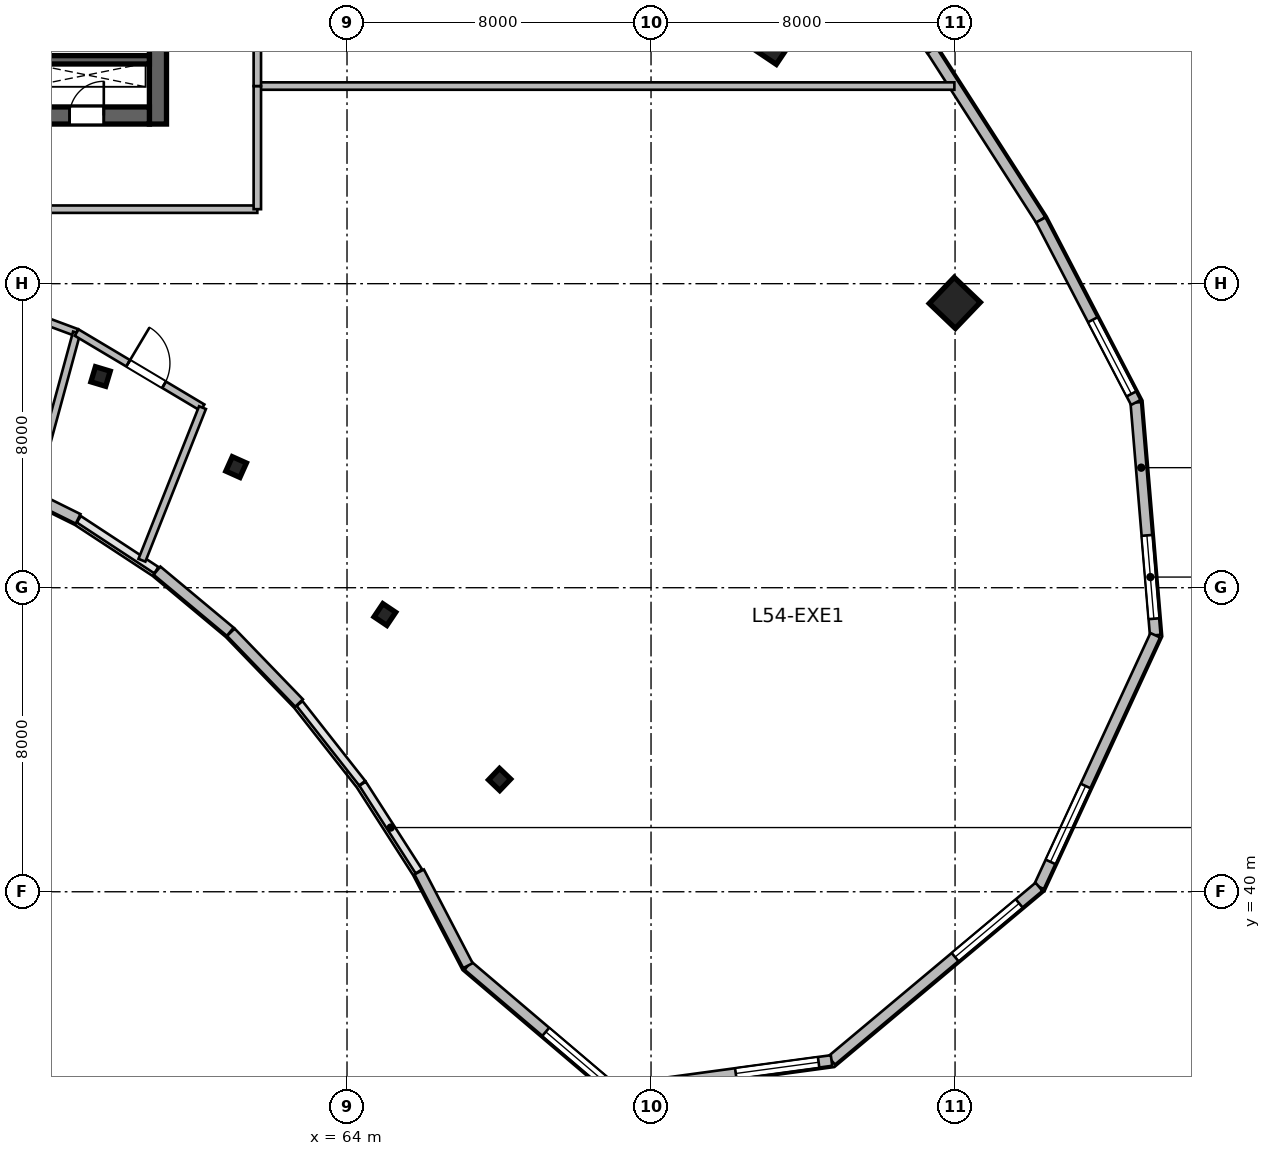
"""IFC4 building model, lengths in metres.
Left out: names, types, materials, properties, quantities, classifications, styles, units other than length and angle.
Written with IfcOpenShell. Run it as: python <this file> out.ifc"""

import sys

from ifc_helpers import new_model, si_unit, direction, frame, frame_2d, origin, origin_2d, place, context, subcontext, project, spatial, rectangle, i_section, extrude, source, transform, mapped, element, fill, save


model = new_model("IFC4")
c1 = context("Model", 3, precision=1e-05, world=origin(), true_north=direction((0.0, 1.0)))
c2 = subcontext(c1, "Body", "Model", "MODEL_VIEW")
j1 = project(units=[si_unit("LENGTHUNIT", "METRE"), si_unit("PLANEANGLEUNIT", "RADIAN")], contexts=[c1])
p1 = place(None, origin())
s1 = spatial("IfcSite", under=j1, at=p1, CompositionType="ELEMENT")
p2 = place(p1, origin())
s2 = spatial("IfcBuilding", under=s1, at=p2, CompositionType="ELEMENT")
p3 = place(p2, frame((0.0, 0.0, 223.5)))
s3 = spatial("IfcBuildingStorey", under=s2, at=p3, CompositionType="ELEMENT", Elevation=223.5)
m1 = source(origin(), c2, "Body", "SweptSolid", [
    extrude(rectangle(XDim=12.0, YDim=0.45, at=frame_2d((6.0, 0.0))), origin(), (0.0, 0.0, 1.0), 3.9),
])
p4 = place(p3, frame((59.025, 60.2, 0.0), z_axis=(0.0, 0.0, 1.0), x_axis=(0.0, 1.0, 0.0)))
e1 = element("IfcWall", 1, at=p4, inside=s3, PredefinedType="SHEAR", context=c2, shape_type="MappedRepresentation", body=[
    mapped(m1, transform((0.0, 0.0, 0.0), scale=1.0)),
])
m2 = source(origin(), c2, "Body", "SweptSolid", [
    extrude(rectangle(XDim=21.6, YDim=0.45, at=frame_2d((10.8, 0.0))), origin(), (0.0, 0.0, 1.0), 3.9),
])
p5 = place(p3, frame((37.2, 60.425, 0.0), z_axis=(0.0, 0.0, 1.0), x_axis=(1.0, 0.0, 0.0)))
e2 = element("IfcWall", 2, at=p5, inside=s3, PredefinedType="SHEAR", context=c2, shape_type="MappedRepresentation", body=[
    mapped(m2, transform((0.0, 0.0, 0.0), scale=1.0)),
])
p6 = place(p5, frame((1.1, 0.0, 0.0)))
e3 = element("IfcOpeningElement", 3, at=p6, cuts=e2, PredefinedType="OPENING", context=c2, shape_type="SweptSolid", body=[
    extrude(rectangle(XDim=1.15, YDim=2.15, at=frame_2d((0.575, 1.075))), frame((0.0, 0.235, 0.0), z_axis=(0.0, -1.0, 0.0), x_axis=(1.0, 0.0, 0.0)), (0.0, 0.0, 1.0), 0.47),
])
p7 = place(p5, frame((19.5, 0.0, 0.0)))
e4 = element("IfcOpeningElement", 4, at=p7, cuts=e2, PredefinedType="OPENING", context=c2, shape_type="SweptSolid", body=[
    extrude(rectangle(XDim=0.9, YDim=2.1, at=frame_2d((0.45, 1.05))), frame((0.0, 0.235, 0.0), z_axis=(0.0, -1.0, 0.0), x_axis=(1.0, 0.0, 0.0)), (0.0, 0.0, 1.0), 0.47),
])
p8 = place(p5, frame((12.02, 0.0, 0.0)))
e5 = element("IfcOpeningElement", 5, at=p8, cuts=e2, PredefinedType="OPENING", context=c2, shape_type="SweptSolid", body=[
    extrude(rectangle(XDim=1.6, YDim=2.15, at=frame_2d((0.8, 1.075))), frame((0.0, 0.235, 0.0), z_axis=(0.0, -1.0, 0.0), x_axis=(1.0, 0.0, 0.0)), (0.0, 0.0, 1.0), 0.47),
])
m3 = source(origin(), c2, "Body", "SweptSolid", [
    extrude(rectangle(XDim=3.27, YDim=0.22, at=frame_2d((1.635, 0.0))), origin(), (0.0, 0.0, 1.0), 3.9),
])
p9 = place(p3, frame((55.53, 61.89, 0.0), z_axis=(0.0, 0.0, 1.0), x_axis=(1.0, 0.0, 0.0)))
e6 = element("IfcWall", 6, at=p9, inside=s3, PredefinedType="SHEAR", context=c2, shape_type="MappedRepresentation", body=[
    mapped(m3, transform((0.0, 0.0, 0.0), scale=1.0)),
])
m4 = source(origin(), c2, "Body", "SweptSolid", [
    extrude(i_section(OverallWidth=0.406, OverallDepth=0.416, WebThickness=0.03, FlangeThickness=0.048, at=origin_2d()), origin(), (0.0, 0.0, 1.0), 3.9),
])
for number, where, z_axis, x_axis in (
    (7, (57.515, 53.558, 0.0), (0.0, 0.0, 1.0), (0.289, 0.957, 0.0)),
    (8, (61.082, 51.175, 0.0), (0.0, 0.0, 1.0), (0.409, 0.912, 0.0)),
    (9, (64.996, 47.294, 0.0), (0.0, 0.0, 1.0), (0.558, 0.83, 0.0)),
):
    element("IfcColumn", number, at=place(p3, frame(where, z_axis=z_axis, x_axis=x_axis)), inside=s3, PredefinedType="COLUMN", context=c2, shape_type="MappedRepresentation", body=[
        mapped(m4, transform((0.0, 0.0, 0.0), scale=1.0)),
    ])
m5 = source(origin(), c2, "Body", "SweptSolid", [
    extrude(rectangle(XDim=0.95, YDim=0.95, at=origin_2d()), origin(), (0.0, 0.0, 1.0), 3.9),
])
p10 = place(p3, frame((75.167, 62.43, 0.0), z_axis=(0.0, 0.0, 1.0), x_axis=(0.55774510898, 0.830012285095, 0.0)))
e10 = element("IfcColumn", 10, at=p10, inside=s3, PredefinedType="COLUMN", context=c2, shape_type="MappedRepresentation", body=[
    mapped(m5, transform((0.0, 0.0, 0.0), scale=1.0)),
])
p11 = place(p3, frame((68.015, 42.955, 0.0), z_axis=(0.0, 0.0, 1.0), x_axis=(0.690756218984, 0.723087716626, 0.0)))
e11 = element("IfcColumn", 11, at=p11, inside=s3, PredefinedType="COLUMN", context=c2, shape_type="MappedRepresentation", body=[
    mapped(m4, transform((0.0, 0.0, 0.0), scale=1.0)),
])
p12 = place(p3, frame((79.993, 55.494, 0.0), z_axis=(0.0, 0.0, 1.0), x_axis=(0.690756218984, 0.723087716626, 0.0)))
e12 = element("IfcColumn", 12, at=p12, inside=s3, PredefinedType="COLUMN", context=c2, shape_type="MappedRepresentation", body=[
    mapped(m5, transform((0.0, 0.0, 0.0), scale=1.0)),
])
m6 = source(origin(), c2, "Body", "SweptSolid", [
    extrude(rectangle(XDim=6.146, YDim=0.28, at=frame_2d((3.073, 0.0))), origin(), (0.0, 0.0, 1.0), 3.64),
])
p13 = place(p3, frame((84.756, 52.874, 0.0), z_axis=(0.0, 0.0, 1.0), x_axis=(0.083301904456, -0.996524356307, 0.0)))
e13 = element("IfcWall", 13, at=p13, inside=s3, PredefinedType="SOLIDWALL", context=c2, shape_type="MappedRepresentation", body=[
    mapped(m6, transform((0.0, 0.0, 0.0), scale=1.0)),
])
p14 = place(p13, frame((3.509, 0.0, 0.95)))
e14 = element("IfcOpeningElement", 14, at=p14, cuts=e13, PredefinedType="OPENING", context=c2, shape_type="SweptSolid", body=[
    extrude(rectangle(XDim=2.2, YDim=2.1, at=frame_2d((1.1, 1.05))), frame((0.0, 0.15, 0.0), z_axis=(0.0, -1.0, 0.0), x_axis=(1.0, 0.0, 0.0)), (0.0, 0.0, 1.0), 0.3),
])
m7 = source(origin(), c2, "Body", "SweptSolid", [
    extrude(rectangle(XDim=7.292, YDim=0.28, at=frame_2d((3.646, 0.0))), origin(), (0.0, 0.0, 1.0), 3.64),
])
p15 = place(p3, frame((85.268, 46.749, 0.0), z_axis=(0.0, 0.0, 1.0), x_axis=(-0.419642001049, -0.907689699708, 0.0)))
e15 = element("IfcWall", 15, at=p15, inside=s3, PredefinedType="SOLIDWALL", context=c2, shape_type="MappedRepresentation", body=[
    mapped(m7, transform((0.0, 0.0, 0.0), scale=1.0)),
])
p16 = place(p15, frame((4.369, 0.0, 0.95)))
e16 = element("IfcOpeningElement", 16, at=p16, cuts=e15, PredefinedType="OPENING", context=c2, shape_type="SweptSolid", body=[
    extrude(rectangle(XDim=2.2, YDim=2.1, at=frame_2d((1.1, 1.05))), frame((0.0, 0.15, 0.0), z_axis=(0.0, -1.0, 0.0), x_axis=(1.0, 0.0, 0.0)), (0.0, 0.0, 1.0), 0.3),
])
m8 = source(origin(), c2, "Body", "SweptSolid", [
    extrude(rectangle(XDim=7.12, YDim=0.28, at=frame_2d((3.56, 0.0))), origin(), (0.0, 0.0, 1.0), 3.64),
])
p17 = place(p3, frame((82.208, 40.131, 0.0), z_axis=(0.0, 0.0, 1.0), x_axis=(-0.766709783564, -0.641993853387, 0.0)))
e17 = element("IfcWall", 17, at=p17, inside=s3, PredefinedType="SOLIDWALL", context=c2, shape_type="MappedRepresentation", body=[
    mapped(m8, transform((0.0, 0.0, 0.0), scale=1.0)),
])
p18 = place(p17, frame((0.68, 0.0, 0.95)))
e18 = element("IfcOpeningElement", 18, at=p18, cuts=e17, PredefinedType="OPENING", context=c2, shape_type="SweptSolid", body=[
    extrude(rectangle(XDim=2.2, YDim=2.1, at=frame_2d((1.1, 1.05))), frame((0.0, 0.15, 0.0), z_axis=(0.0, -1.0, 0.0), x_axis=(1.0, 0.0, 0.0)), (0.0, 0.0, 1.0), 0.3),
])
m9 = source(origin(), c2, "Body", "SweptSolid", [
    extrude(rectangle(XDim=5.771, YDim=0.28, at=frame_2d((2.886, 0.0))), origin(), (0.0, 0.0, 1.0), 3.64),
])
p19 = place(p3, frame((76.75, 35.56, 0.0), z_axis=(0.0, 0.0, 1.0), x_axis=(-0.990933615537, -0.134352408237, 0.0)))
e19 = element("IfcWall", 19, at=p19, inside=s3, PredefinedType="SOLIDWALL", context=c2, shape_type="MappedRepresentation", body=[
    mapped(m9, transform((0.0, 0.0, 0.0), scale=1.0)),
])
p20 = place(p19, frame((0.343, 0.0, 0.95)))
e20 = element("IfcOpeningElement", 20, at=p20, cuts=e19, PredefinedType="OPENING", context=c2, shape_type="SweptSolid", body=[
    extrude(rectangle(XDim=2.2, YDim=2.1, at=frame_2d((1.1, 1.05))), frame((0.0, 0.15, 0.0), z_axis=(0.0, -1.0, 0.0), x_axis=(1.0, 0.0, 0.0)), (0.0, 0.0, 1.0), 0.3),
])
m10 = source(origin(), c2, "Body", "SweptSolid", [
    extrude(rectangle(XDim=5.051, YDim=0.28, at=frame_2d((2.525, 0.0))), origin(), (0.0, 0.0, 1.0), 3.64),
])
p21 = place(p3, frame((71.031, 34.784, 0.0), z_axis=(0.0, 0.0, 1.0), x_axis=(-0.761904731537, 0.647689107568, 0.0)))
e21 = element("IfcWall", 21, at=p21, inside=s3, PredefinedType="SOLIDWALL", context=c2, shape_type="MappedRepresentation", body=[
    mapped(m10, transform((0.0, 0.0, 0.0), scale=1.0)),
])
p22 = place(p21, frame((0.163, 0.0, 0.95)))
e22 = element("IfcOpeningElement", 22, at=p22, cuts=e21, PredefinedType="OPENING", context=c2, shape_type="SweptSolid", body=[
    extrude(rectangle(XDim=2.2, YDim=2.1, at=frame_2d((1.1, 1.05))), frame((0.0, 0.15, 0.0), z_axis=(0.0, -1.0, 0.0), x_axis=(1.0, 0.0, 0.0)), (0.0, 0.0, 1.0), 0.3),
])
m11 = source(origin(), c2, "Body", "SweptSolid", [
    extrude(rectangle(XDim=2.779, YDim=0.28, at=frame_2d((1.39, 0.0))), origin(), (0.0, 0.0, 1.0), 3.64),
])
p23 = place(p3, frame((67.182, 38.056, 0.0), z_axis=(0.0, 0.0, 1.0), x_axis=(-0.461770308601, 0.886999538948, 0.0)))
e23 = element("IfcWall", 23, at=p23, inside=s3, PredefinedType="SOLIDWALL", context=c2, shape_type="MappedRepresentation", body=[
    mapped(m11, transform((0.0, 0.0, 0.0), scale=1.0)),
])
m12 = source(origin(), c2, "Body", "SweptSolid", [
    extrude(rectangle(XDim=2.588, YDim=0.28, at=frame_2d((1.294, 0.0))), origin(), (0.0, 0.0, 1.0), 3.64),
])
p24 = place(p3, frame((62.74, 44.966, 0.0), z_axis=(0.0, 0.0, 1.0), x_axis=(-0.694687114507, 0.719312041424, 0.0)))
e24 = element("IfcWall", 24, at=p24, inside=s3, PredefinedType="SOLIDWALL", context=c2, shape_type="MappedRepresentation", body=[
    mapped(m12, transform((0.0, 0.0, 0.0), scale=1.0)),
])
m13 = source(origin(), c2, "Body", "SweptSolid", [
    extrude(rectangle(XDim=2.511, YDim=0.28, at=frame_2d((1.256, 0.0))), origin(), (0.0, 0.0, 1.0), 3.64),
])
p25 = place(p3, frame((60.928, 46.841, 0.0), z_axis=(0.0, 0.0, 1.0), x_axis=(-0.767910416122, 0.640557251782, 0.0)))
e25 = element("IfcWall", 25, at=p25, inside=s3, PredefinedType="SOLIDWALL", context=c2, shape_type="MappedRepresentation", body=[
    mapped(m13, transform((0.0, 0.0, 0.0), scale=1.0)),
])
m14 = source(origin(), c2, "Body", "SweptSolid", [
    extrude(rectangle(XDim=2.378, YDim=0.28, at=frame_2d((1.189, 0.0))), origin(), (0.0, 0.0, 1.0), 3.64),
])
p26 = place(p3, frame((56.924, 49.812, 0.0), z_axis=(0.0, 0.0, 1.0), x_axis=(-0.895941616831, 0.444171835252, 0.0)))
e26 = element("IfcWall", 26, at=p26, inside=s3, PredefinedType="SOLIDWALL", context=c2, shape_type="MappedRepresentation", body=[
    mapped(m14, transform((0.0, 0.0, 0.0), scale=1.0)),
])
m15 = source(origin(), c2, "Body", "SweptSolid", [
    extrude(rectangle(XDim=5.153, YDim=0.28, at=frame_2d((2.577, 0.0))), origin(), (0.0, 0.0, 1.0), 3.64),
])
p27 = place(p3, frame((76.205, 66.19, 0.0), z_axis=(0.0, 0.0, 1.0), x_axis=(0.618179283891, -0.786037132054, 0.0)))
e27 = element("IfcWall", 27, at=p27, inside=s3, PredefinedType="SOLIDWALL", context=c2, shape_type="MappedRepresentation", body=[
    mapped(m15, transform((0.0, 0.0, 0.0), scale=1.0)),
])
m16 = source(origin(), c2, "Body", "SweptSolid", [
    extrude(rectangle(XDim=5.303, YDim=0.28, at=frame_2d((2.651, 0.0))), origin(), (0.0, 0.0, 1.0), 3.64),
])
p28 = place(p3, frame((79.391, 62.14, 0.0), z_axis=(0.0, 0.0, 1.0), x_axis=(0.540178067041, -0.84155074469, 0.0)))
e28 = element("IfcWall", 28, at=p28, inside=s3, PredefinedType="SOLIDWALL", context=c2, shape_type="MappedRepresentation", body=[
    mapped(m16, transform((0.0, 0.0, 0.0), scale=1.0)),
])
m17 = source(origin(), c2, "Body", "SweptSolid", [
    extrude(rectangle(XDim=5.416, YDim=0.28, at=frame_2d((2.708, 0.0))), origin(), (0.0, 0.0, 1.0), 3.64),
])
p29 = place(p3, frame((82.255, 57.677, 0.0), z_axis=(0.0, 0.0, 1.0), x_axis=(0.46177852435, -0.886995261796, 0.0)))
e29 = element("IfcWall", 29, at=p29, inside=s3, PredefinedType="SOLIDWALL", context=c2, shape_type="MappedRepresentation", body=[
    mapped(m17, transform((0.0, 0.0, 0.0), scale=1.0)),
])
p30 = place(p29, frame((2.962, 0.0, 0.95)))
e30 = element("IfcOpeningElement", 30, at=p30, cuts=e29, PredefinedType="OPENING", context=c2, shape_type="SweptSolid", body=[
    extrude(rectangle(XDim=2.2, YDim=2.1, at=frame_2d((1.1, 1.05))), frame((0.0, 0.15, 0.0), z_axis=(0.0, -1.0, 0.0), x_axis=(1.0, 0.0, 0.0)), (0.0, 0.0, 1.0), 0.3),
])
m18 = source(origin(), c2, "Body", "SweptSolid", [
    extrude(rectangle(XDim=4.191, YDim=0.195, at=frame_2d((2.095, 0.0))), origin(), (0.0, 0.0, 1.0), 3.64),
])
p31 = place(p3, frame((52.957, 56.174, 0.0), z_axis=(0.0, 0.0, 1.0), x_axis=(0.937361695407, -0.348357649527, 0.0)))
e31 = element("IfcWall", 31, at=p31, inside=s3, PredefinedType="PARTITIONING", context=c2, shape_type="MappedRepresentation", body=[
    mapped(m18, transform((0.0, 0.0, 0.0), scale=1.0)),
])
p32 = place(p31, frame((1.545, 0.0, 0.0)))
e32 = element("IfcOpeningElement", 32, at=p32, cuts=e31, PredefinedType="OPENING", context=c2, shape_type="SweptSolid", body=[
    extrude(rectangle(XDim=1.1, YDim=2.15, at=frame_2d((0.55, 1.075))), frame((0.0, 0.107, 0.0), z_axis=(0.0, -1.0, 0.0), x_axis=(1.0, 0.0, 0.0)), (0.0, 0.0, 1.0), 0.215),
])
m19 = source(origin(), c2, "Body", "SweptSolid", [
    extrude(rectangle(XDim=4.449, YDim=0.195, at=frame_2d((2.225, 0.0))), origin(), (0.0, 0.0, 1.0), 3.64),
])
p33 = place(p3, frame((55.719, 50.42, 0.0), z_axis=(0.0, 0.0, 1.0), x_axis=(0.262123660516, 0.965034292965, 0.0)))
e33 = element("IfcWall", 33, at=p33, inside=s3, PredefinedType="PARTITIONING", context=c2, shape_type="MappedRepresentation", body=[
    mapped(m19, transform((0.0, 0.0, 0.0), scale=1.0)),
])
m20 = source(origin(), c2, "Body", "SweptSolid", [
    extrude(rectangle(XDim=3.856, YDim=0.195, at=frame_2d((1.928, 0.0))), origin(), (0.0, 0.0, 1.0), 3.64),
])
p34 = place(p3, frame((56.886, 54.714, 0.0), z_axis=(0.0, 0.0, 1.0), x_axis=(0.858797511375, -0.512315171019, 0.0)))
e34 = element("IfcWall", 34, at=p34, inside=s3, PredefinedType="PARTITIONING", context=c2, shape_type="MappedRepresentation", body=[
    mapped(m20, transform((0.0, 0.0, 0.0), scale=1.0)),
])
p35 = place(p34, frame((1.578, 0.0, 0.0)))
e35 = element("IfcOpeningElement", 35, at=p35, cuts=e34, PredefinedType="OPENING", context=c2, shape_type="SweptSolid", body=[
    extrude(rectangle(XDim=1.1, YDim=2.15, at=frame_2d((0.55, 1.075))), frame((0.0, 0.107, 0.0), z_axis=(0.0, -1.0, 0.0), x_axis=(1.0, 0.0, 0.0)), (0.0, 0.0, 1.0), 0.215),
])
m21 = source(origin(), c2, "Body", "SweptSolid", [
    extrude(rectangle(XDim=4.32, YDim=0.195, at=frame_2d((2.16, 0.0))), origin(), (0.0, 0.0, 1.0), 3.64),
])
p36 = place(p3, frame((58.604, 48.723, 0.0), z_axis=(0.0, 0.0, 1.0), x_axis=(0.368846295269, 0.929490403644, 0.0)))
e36 = element("IfcWall", 36, at=p36, inside=s3, PredefinedType="PARTITIONING", context=c2, shape_type="MappedRepresentation", body=[
    mapped(m21, transform((0.0, 0.0, 0.0), scale=1.0)),
])
m22 = source(origin(), c2, "Body", "SweptSolid", [
    extrude(rectangle(XDim=12.39, YDim=0.195, at=frame_2d((6.195, 0.0))), origin(), (0.0, 0.0, 1.0), 3.64),
])
p37 = place(p3, frame((49.25, 57.96, 0.0), z_axis=(0.0, 0.0, 1.0), x_axis=(1.0, 0.0, 0.0)))
e37 = element("IfcWall", 37, at=p37, inside=s3, PredefinedType="PARTITIONING", context=c2, shape_type="MappedRepresentation", body=[
    mapped(m22, transform((0.0, 0.0, 0.0), scale=1.0)),
])
m23 = source(origin(), c2, "Body", "SweptSolid", [
    extrude(rectangle(XDim=18.342, YDim=0.195, at=frame_2d((9.171, 0.0))), origin(), (0.0, 0.0, 1.0), 3.64),
])
p38 = place(p3, frame((61.64, 61.2, 0.0), z_axis=(0.0, 0.0, 1.0), x_axis=(1.0, 0.0, 0.0)))
e38 = element("IfcWall", 38, at=p38, inside=s3, PredefinedType="PARTITIONING", context=c2, shape_type="MappedRepresentation", body=[
    mapped(m23, transform((0.0, 0.0, 0.0), scale=1.0)),
])
m24 = source(origin(), c2, "Body", "SweptSolid", [
    extrude(rectangle(XDim=3.24, YDim=0.195, at=frame_2d((1.62, 0.0))), origin(), (0.0, 0.0, 1.0), 3.64),
])
p39 = place(p3, frame((61.64, 57.96, 0.0), z_axis=(0.0, 0.0, 1.0), x_axis=(0.0, 1.0, 0.0)))
e39 = element("IfcWall", 39, at=p39, inside=s3, PredefinedType="PARTITIONING", context=c2, shape_type="MappedRepresentation", body=[
    mapped(m24, transform((0.0, 0.0, 0.0), scale=1.0)),
])
m25 = source(origin(), c2, "Body", "SweptSolid", [
    extrude(rectangle(XDim=4.0, YDim=0.195, at=frame_2d((2.0, 0.0))), origin(), (0.0, 0.0, 1.0), 3.64),
])
p40 = place(p3, frame((61.64, 61.2, 0.0), z_axis=(0.0, 0.0, 1.0), x_axis=(0.0, 1.0, 0.0)))
e40 = element("IfcWall", 40, at=p40, inside=s3, PredefinedType="PARTITIONING", context=c2, shape_type="MappedRepresentation", body=[
    mapped(m25, transform((0.0, 0.0, 0.0), scale=1.0)),
])
p41 = place(p40, frame((1.045, 0.0, 0.0)))
e41 = element("IfcOpeningElement", 41, at=p41, cuts=e40, PredefinedType="OPENING", context=c2, shape_type="SweptSolid", body=[
    extrude(rectangle(XDim=0.95, YDim=2.1, at=frame_2d((0.475, 1.05))), frame((0.0, 0.107, 0.0), z_axis=(0.0, -1.0, 0.0), x_axis=(1.0, 0.0, 0.0)), (0.0, 0.0, 1.0), 0.215),
])
m26 = source(origin(), c2, "Body", "SweptSolid", [
    extrude(rectangle(XDim=2.2, YDim=2.1, at=frame_2d((1.1, 1.05))), frame((0.0, 0.03, 0.0), z_axis=(0.0, -1.0, 0.0), x_axis=(1.0, 0.0, 0.0)), (0.0, 0.0, 1.0), 0.06),
])
p42 = place(p14, origin())
e42 = element("IfcWindow", 42, at=p42, inside=s3, PartitioningType="TRIPLE_PANEL_VERTICAL", PredefinedType="WINDOW", context=c2, shape_type="MappedRepresentation", body=[
    mapped(m26, transform((0.0, 0.0, 0.0), scale=1.0)),
])
fill(e14, e42)
p43 = place(p16, origin())
e43 = element("IfcWindow", 43, at=p43, inside=s3, PartitioningType="TRIPLE_PANEL_VERTICAL", PredefinedType="WINDOW", context=c2, shape_type="MappedRepresentation", body=[
    mapped(m26, transform((0.0, 0.0, 0.0), scale=1.0)),
])
fill(e16, e43)
p44 = place(p18, origin())
e44 = element("IfcWindow", 44, at=p44, inside=s3, PartitioningType="TRIPLE_PANEL_VERTICAL", PredefinedType="WINDOW", context=c2, shape_type="MappedRepresentation", body=[
    mapped(m26, transform((0.0, 0.0, 0.0), scale=1.0)),
])
fill(e18, e44)
p45 = place(p20, origin())
e45 = element("IfcWindow", 45, at=p45, inside=s3, PartitioningType="TRIPLE_PANEL_VERTICAL", PredefinedType="WINDOW", context=c2, shape_type="MappedRepresentation", body=[
    mapped(m26, transform((0.0, 0.0, 0.0), scale=1.0)),
])
fill(e20, e45)
p46 = place(p22, origin())
e46 = element("IfcWindow", 46, at=p46, inside=s3, PartitioningType="TRIPLE_PANEL_VERTICAL", PredefinedType="WINDOW", context=c2, shape_type="MappedRepresentation", body=[
    mapped(m26, transform((0.0, 0.0, 0.0), scale=1.0)),
])
fill(e22, e46)
p47 = place(p30, origin())
e47 = element("IfcWindow", 47, at=p47, inside=s3, PartitioningType="TRIPLE_PANEL_VERTICAL", PredefinedType="WINDOW", context=c2, shape_type="MappedRepresentation", body=[
    mapped(m26, transform((0.0, 0.0, 0.0), scale=1.0)),
])
fill(e30, e47)
m27 = source(origin(), c2, "Body", "SweptSolid", [
    extrude(rectangle(XDim=0.9, YDim=2.1, at=frame_2d((0.45, 1.05))), frame((0.0, 0.025, 0.0), z_axis=(0.0, -1.0, 0.0), x_axis=(1.0, 0.0, 0.0)), (0.0, 0.0, 1.0), 0.05),
])
p48 = place(p7, origin())
e48 = element("IfcDoor", 48, at=p48, inside=s3, OperationType="SINGLE_SWING_RIGHT", PredefinedType="DOOR", context=c2, shape_type="MappedRepresentation", body=[
    mapped(m27, transform((0.0, 0.0, 0.0), scale=1.0)),
])
fill(e4, e48)
m28 = source(origin(), c2, "Body", "SweptSolid", [
    extrude(rectangle(XDim=1.1, YDim=2.15, at=frame_2d((0.55, 1.075))), frame((0.0, 0.025, 0.0), z_axis=(0.0, -1.0, 0.0), x_axis=(1.0, 0.0, 0.0)), (0.0, 0.0, 1.0), 0.05),
])
p49 = place(p35, origin())
e49 = element("IfcDoor", 49, at=p49, inside=s3, OperationType="SINGLE_SWING_LEFT", PredefinedType="DOOR", context=c2, shape_type="MappedRepresentation", body=[
    mapped(m28, transform((0.0, 0.0, 0.0), scale=1.0)),
])
fill(e35, e49)
save(model, sys.argv[1])
